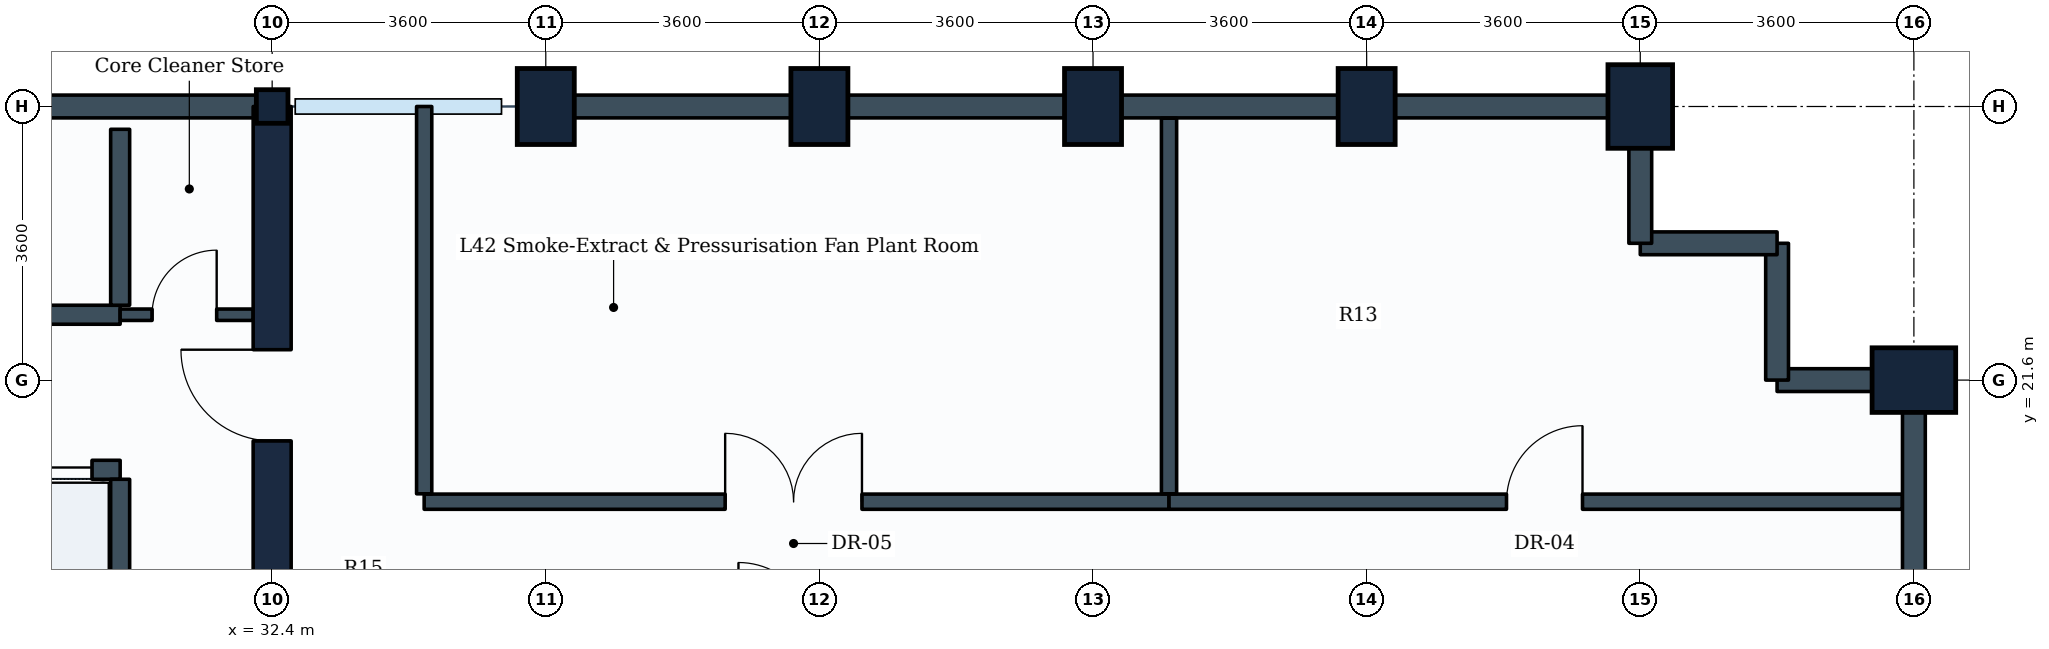
"""IFC4 building model, lengths in metres.
Left out: names, types, materials, properties, quantities, classifications, styles, units other than length and angle.
Written with IfcOpenShell. Run it as: python <this file> out.ifc"""

import sys

from ifc_helpers import new_model, si_unit, direction, frame, frame_2d, origin, origin_2d, place, context, subcontext, project, spatial, rectangle, i_section, extrude, element, fill, save


model = new_model("IFC4")
c1 = context("Model", 3, precision=1e-05, world=origin(), true_north=direction((0.0, 1.0)))
c2 = subcontext(c1, "Body", "Model", "MODEL_VIEW")
j1 = project(units=[si_unit("LENGTHUNIT", "METRE"), si_unit("PLANEANGLEUNIT", "RADIAN")], contexts=[c1])
p1 = place(None, origin())
s1 = spatial("IfcSite", under=j1, at=p1, CompositionType="ELEMENT")
p2 = place(p1, origin())
s2 = spatial("IfcBuilding", under=s1, at=p2, CompositionType="ELEMENT")
p3 = place(p2, frame((0.0, 0.0, 169.4)))
s3 = spatial("IfcBuildingStorey", under=s2, at=p3, CompositionType="ELEMENT", Elevation=169.4)
p4 = place(p3, frame((32.4, 25.2, 0.0), z_axis=(0.0, 0.0, 1.0), x_axis=(1.0, 0.0, 0.0)))
e1 = element("IfcColumn", 1, at=p4, inside=s3, PredefinedType="COLUMN", context=c2, shape_type="SweptSolid", body=[
    extrude(i_section(OverallWidth=0.416, OverallDepth=0.442, WebThickness=0.025, FlangeThickness=0.041, FilletRadius=0.015, at=origin_2d()), origin(), (0.0, 0.0, 1.0), 5.4),
])
for number, where, z_axis, x_axis in (
    (2, (36.0, 25.2, 0.0), (0.0, 0.0, 1.0), (1.0, 0.0, 0.0)),
    (3, (39.6, 25.2, 0.0), (0.0, 0.0, 1.0), (1.0, 0.0, 0.0)),
    (4, (43.2, 25.2, 0.0), (0.0, 0.0, 1.0), (1.0, 0.0, 0.0)),
    (5, (46.8, 25.2, 0.0), (0.0, 0.0, 1.0), (1.0, 0.0, 0.0)),
):
    element("IfcColumn", number, at=place(p3, frame(where, z_axis=z_axis, x_axis=x_axis)), inside=s3, PredefinedType="COLUMN", context=c2, shape_type="SweptSolid", body=[
        extrude(rectangle(XDim=0.75, YDim=1.0, at=origin_2d()), origin(), (0.0, 0.0, 1.0), 5.4),
    ])
for number, where, z_axis, x_axis in (
    (6, (50.4, 25.2, 0.0), (0.0, 0.0, 1.0), (1.0, 0.0, 0.0)),
    (7, (54.0, 21.6, 0.0), (0.0, 0.0, 1.0), (0.0, 1.0, 0.0)),
):
    element("IfcColumn", number, at=place(p3, frame(where, z_axis=z_axis, x_axis=x_axis)), inside=s3, PredefinedType="COLUMN", context=c2, shape_type="SweptSolid", body=[
        extrude(rectangle(XDim=0.85, YDim=1.1, at=origin_2d()), origin(), (0.0, 0.0, 1.0), 5.4),
    ])
p5 = place(p3, frame((54.0, 21.6, 0.0), z_axis=(0.0, 0.0, 1.0), x_axis=(0.0, -1.0, 0.0)))
e8 = element("IfcWall", 8, at=p5, inside=s3, PredefinedType="STANDARD", context=c2, shape_type="SweptSolid", body=[
    extrude(rectangle(XDim=3.6, YDim=0.3, at=frame_2d((1.8, 0.0))), origin(), (0.0, 0.0, 1.0), 4.03),
])
p6 = place(p3, frame((52.2, 21.6, 0.0), z_axis=(0.0, 0.0, 1.0), x_axis=(1.0, 0.0, 0.0)))
e9 = element("IfcWall", 9, at=p6, inside=s3, PredefinedType="STANDARD", context=c2, shape_type="SweptSolid", body=[
    extrude(rectangle(XDim=1.8, YDim=0.3, at=frame_2d((0.9, 0.0))), origin(), (0.0, 0.0, 1.0), 4.03),
])
p7 = place(p3, frame((52.2, 23.4, 0.0), z_axis=(0.0, 0.0, 1.0), x_axis=(0.0, -1.0, 0.0)))
e10 = element("IfcWall", 10, at=p7, inside=s3, PredefinedType="STANDARD", context=c2, shape_type="SweptSolid", body=[
    extrude(rectangle(XDim=1.8, YDim=0.3, at=frame_2d((0.9, 0.0))), origin(), (0.0, 0.0, 1.0), 5.065),
])
for number, where, z_axis, x_axis in (
    (11, (50.4, 23.4, 0.0), (0.0, 0.0, 1.0), (1.0, 0.0, 0.0)),
    (12, (50.4, 25.2, 0.0), (0.0, 0.0, 1.0), (0.0, -1.0, 0.0)),
):
    element("IfcWall", number, at=place(p3, frame(where, z_axis=z_axis, x_axis=x_axis)), inside=s3, PredefinedType="STANDARD", context=c2, shape_type="SweptSolid", body=[
        extrude(rectangle(XDim=1.8, YDim=0.3, at=frame_2d((0.9, 0.0))), origin(), (0.0, 0.0, 1.0), 3.58),
    ])
p8 = place(p3, frame((46.8, 25.2, 0.0), z_axis=(0.0, 0.0, 1.0), x_axis=(1.0, 0.0, 0.0)))
e13 = element("IfcWall", 13, at=p8, inside=s3, PredefinedType="STANDARD", context=c2, shape_type="SweptSolid", body=[
    extrude(rectangle(XDim=3.6, YDim=0.3, at=frame_2d((1.8, 0.0))), origin(), (0.0, 0.0, 1.0), 3.58),
])
p9 = place(p3, frame((43.2, 25.2, 0.0), z_axis=(0.0, 0.0, 1.0), x_axis=(1.0, 0.0, 0.0)))
e14 = element("IfcWall", 14, at=p9, inside=s3, PredefinedType="STANDARD", context=c2, shape_type="SweptSolid", body=[
    extrude(rectangle(XDim=3.6, YDim=0.3, at=frame_2d((1.8, 0.0))), origin(), (0.0, 0.0, 1.0), 4.53),
])
p10 = place(p3, frame((39.6, 25.2, 0.0), z_axis=(0.0, 0.0, 1.0), x_axis=(1.0, 0.0, 0.0)))
e15 = element("IfcWall", 15, at=p10, inside=s3, PredefinedType="STANDARD", context=c2, shape_type="SweptSolid", body=[
    extrude(rectangle(XDim=3.6, YDim=0.3, at=frame_2d((1.8, 0.0))), origin(), (0.0, 0.0, 1.0), 4.53),
])
p11 = place(p3, frame((36.0, 25.2, 0.0), z_axis=(0.0, 0.0, 1.0), x_axis=(1.0, 0.0, 0.0)))
e16 = element("IfcWall", 16, at=p11, inside=s3, PredefinedType="STANDARD", context=c2, shape_type="SweptSolid", body=[
    extrude(rectangle(XDim=3.6, YDim=0.3, at=frame_2d((1.8, 0.0))), origin(), (0.0, 0.0, 1.0), 4.53),
])
p12 = place(p3, frame((28.8, 25.2, 0.0), z_axis=(0.0, 0.0, 1.0), x_axis=(1.0, 0.0, 0.0)))
e17 = element("IfcWall", 17, at=p12, inside=s3, PredefinedType="STANDARD", context=c2, shape_type="SweptSolid", body=[
    extrude(rectangle(XDim=3.6, YDim=0.3, at=frame_2d((1.8, 0.0))), origin(), (0.0, 0.0, 1.0), 4.53),
])
p13 = place(p3, frame((32.4, 10.8, 0.0), z_axis=(0.0, 0.0, 1.0), x_axis=(0.0, 1.0, 0.0)))
e18 = element("IfcWall", 18, at=p13, inside=s3, PredefinedType="SHEAR", context=c2, shape_type="SweptSolid", body=[
    extrude(rectangle(XDim=14.4, YDim=0.5, at=frame_2d((7.2, 0.0))), origin(), (0.0, 0.0, 1.0), 5.08),
])
p14 = place(p13, frame((4.35, 0.0, 0.0)))
e19 = element("IfcOpeningElement", 19, at=p14, cuts=e18, PredefinedType="OPENING", context=c2, shape_type="SweptSolid", body=[
    extrude(rectangle(XDim=1.2, YDim=2.1, at=frame_2d((0.6, 1.05))), frame((0.0, 0.26, 0.0), z_axis=(0.0, -1.0, 0.0), x_axis=(1.0, 0.0, 0.0)), (0.0, 0.0, 1.0), 0.52),
])
p15 = place(p13, frame((10.0, 0.0, 0.0)))
e20 = element("IfcOpeningElement", 20, at=p15, cuts=e18, PredefinedType="OPENING", context=c2, shape_type="SweptSolid", body=[
    extrude(rectangle(XDim=1.2, YDim=2.1, at=frame_2d((0.6, 1.05))), frame((0.0, 0.26, 0.0), z_axis=(0.0, -1.0, 0.0), x_axis=(1.0, 0.0, 0.0)), (0.0, 0.0, 1.0), 0.52),
])
p16 = place(p3, frame((23.18, 20.42, 0.0), z_axis=(0.0, 0.0, 1.0), x_axis=(1.0, 0.0, 0.0)))
e21 = element("IfcWall", 21, at=p16, inside=s3, PredefinedType="PARTITIONING", context=c2, shape_type="SweptSolid", body=[
    extrude(rectangle(XDim=7.22, YDim=0.25, at=frame_2d((3.61, 0.0))), origin(), (0.0, 0.0, 1.0), 5.065),
])
p17 = place(p16, frame((0.41, 0.0, 0.0)))
e22 = element("IfcOpeningElement", 22, at=p17, cuts=e21, PredefinedType="OPENING", context=c2, shape_type="SweptSolid", body=[
    extrude(rectangle(XDim=1.1, YDim=2.1, at=frame_2d((0.55, 1.05))), frame((0.0, 0.135, 0.0), z_axis=(0.0, -1.0, 0.0), x_axis=(1.0, 0.0, 0.0)), (0.0, 0.0, 1.0), 0.27),
])
p18 = place(p16, frame((2.19, 0.0, 0.0)))
e23 = element("IfcOpeningElement", 23, at=p18, cuts=e21, PredefinedType="OPENING", context=c2, shape_type="SweptSolid", body=[
    extrude(rectangle(XDim=1.1, YDim=2.1, at=frame_2d((0.55, 1.05))), frame((0.0, 0.135, 0.0), z_axis=(0.0, -1.0, 0.0), x_axis=(1.0, 0.0, 0.0)), (0.0, 0.0, 1.0), 0.27),
])
p19 = place(p16, frame((3.97, 0.0, 0.0)))
e24 = element("IfcOpeningElement", 24, at=p19, cuts=e21, PredefinedType="OPENING", context=c2, shape_type="SweptSolid", body=[
    extrude(rectangle(XDim=1.1, YDim=2.1, at=frame_2d((0.55, 1.05))), frame((0.0, 0.135, 0.0), z_axis=(0.0, -1.0, 0.0), x_axis=(1.0, 0.0, 0.0)), (0.0, 0.0, 1.0), 0.27),
])
p20 = place(p16, frame((5.75, 0.0, 0.0)))
e25 = element("IfcOpeningElement", 25, at=p20, cuts=e21, PredefinedType="OPENING", context=c2, shape_type="SweptSolid", body=[
    extrude(rectangle(XDim=1.1, YDim=2.1, at=frame_2d((0.55, 1.05))), frame((0.0, 0.135, 0.0), z_axis=(0.0, -1.0, 0.0), x_axis=(1.0, 0.0, 0.0)), (0.0, 0.0, 1.0), 0.27),
])
p21 = place(p3, frame((30.4, 18.025, 0.0), z_axis=(0.0, 0.0, 1.0), x_axis=(0.0, 1.0, 0.0)))
e26 = element("IfcWall", 26, at=p21, inside=s3, PredefinedType="PARTITIONING", context=c2, shape_type="SweptSolid", body=[
    extrude(rectangle(XDim=2.27, YDim=0.25, at=frame_2d((1.135, 0.0))), origin(), (0.0, 0.0, 1.0), 5.065),
])
p22 = place(p3, frame((23.18, 22.46, 0.0), z_axis=(0.0, 0.0, 1.0), x_axis=(1.0, 0.0, 0.0)))
e27 = element("IfcWall", 27, at=p22, inside=s3, PredefinedType="PARTITIONING", context=c2, shape_type="SweptSolid", body=[
    extrude(rectangle(XDim=7.22, YDim=0.25, at=frame_2d((3.61, 0.0))), origin(), (0.0, 0.0, 1.0), 5.065),
])
p23 = place(p3, frame((30.4, 22.585, 0.0), z_axis=(0.0, 0.0, 1.0), x_axis=(0.0, 1.0, 0.0)))
e28 = element("IfcWall", 28, at=p23, inside=s3, PredefinedType="PARTITIONING", context=c2, shape_type="SweptSolid", body=[
    extrude(rectangle(XDim=2.315, YDim=0.25, at=frame_2d((1.157, 0.0))), origin(), (0.0, 0.0, 1.0), 5.065),
])
p24 = place(p3, frame((30.4, 22.46, 0.0), z_axis=(0.0, 0.0, 1.0), x_axis=(1.0, 0.0, 0.0)))
e29 = element("IfcWall", 29, at=p24, inside=s3, PredefinedType="PARTITIONING", context=c2, shape_type="SweptSolid", body=[
    extrude(rectangle(XDim=1.75, YDim=0.15, at=frame_2d((0.875, 0.0))), origin(), (0.0, 0.0, 1.0), 5.065),
])
p25 = place(p24, frame((0.42, 0.0, 0.0)))
e30 = element("IfcOpeningElement", 30, at=p25, cuts=e29, PredefinedType="OPENING", context=c2, shape_type="SweptSolid", body=[
    extrude(rectangle(XDim=0.85, YDim=2.1, at=frame_2d((0.425, 1.05))), frame((0.0, 0.085, 0.0), z_axis=(0.0, -1.0, 0.0), x_axis=(1.0, 0.0, 0.0)), (0.0, 0.0, 1.0), 0.17),
])
p26 = place(p3, frame((34.4, 20.0, 0.0), z_axis=(0.0, 0.0, 1.0), x_axis=(1.0, 0.0, 0.0)))
e31 = element("IfcWall", 31, at=p26, inside=s3, PredefinedType="PARTITIONING", context=c2, shape_type="SweptSolid", body=[
    extrude(rectangle(XDim=9.8, YDim=0.2, at=frame_2d((4.9, 0.0))), origin(), (0.0, 0.0, 1.0), 4.7),
])
p27 = place(p26, frame((3.96, 0.0, 0.0)))
e32 = element("IfcOpeningElement", 32, at=p27, cuts=e31, PredefinedType="OPENING", context=c2, shape_type="SweptSolid", body=[
    extrude(rectangle(XDim=1.8, YDim=2.2, at=frame_2d((0.9, 1.1))), frame((0.0, 0.11, 0.0), z_axis=(0.0, -1.0, 0.0), x_axis=(1.0, 0.0, 0.0)), (0.0, 0.0, 1.0), 0.22),
])
p28 = place(p3, frame((44.2, 20.0, 0.0), z_axis=(0.0, 0.0, 1.0), x_axis=(1.0, 0.0, 0.0)))
e33 = element("IfcWall", 33, at=p28, inside=s3, PredefinedType="PARTITIONING", context=c2, shape_type="SweptSolid", body=[
    extrude(rectangle(XDim=9.646, YDim=0.2, at=frame_2d((4.823, 0.0))), origin(), (0.0, 0.0, 1.0), 3.58),
])
p29 = place(p28, frame((4.44, 0.0, 0.0)))
e34 = element("IfcOpeningElement", 34, at=p29, cuts=e33, PredefinedType="OPENING", context=c2, shape_type="SweptSolid", body=[
    extrude(rectangle(XDim=1.0, YDim=2.1, at=frame_2d((0.5, 1.05))), frame((0.0, 0.11, 0.0), z_axis=(0.0, -1.0, 0.0), x_axis=(1.0, 0.0, 0.0)), (0.0, 0.0, 1.0), 0.22),
])
p30 = place(p3, frame((34.4, 20.104, 0.0), z_axis=(0.0, 0.0, 1.0), x_axis=(0.0, 1.0, 0.0)))
e35 = element("IfcWall", 35, at=p30, inside=s3, PredefinedType="PARTITIONING", context=c2, shape_type="SweptSolid", body=[
    extrude(rectangle(XDim=5.096, YDim=0.2, at=frame_2d((2.548, 0.0))), origin(), (0.0, 0.0, 1.0), 4.53),
])
p31 = place(p3, frame((44.2, 20.104, 0.0), z_axis=(0.0, 0.0, 1.0), x_axis=(0.0, 1.0, 0.0)))
e36 = element("IfcWall", 36, at=p31, inside=s3, PredefinedType="PARTITIONING", context=c2, shape_type="SweptSolid", body=[
    extrude(rectangle(XDim=4.942, YDim=0.2, at=frame_2d((2.471, 0.0))), origin(), (0.0, 0.0, 1.0), 4.53),
])
p32 = place(p20, origin())
e37 = element("IfcDoor", 37, at=p32, inside=s3, OperationType="SLIDING_TO_LEFT", PredefinedType="DOOR", context=c2, shape_type="SweptSolid", body=[
    extrude(rectangle(XDim=1.1, YDim=2.1, at=frame_2d((0.55, 1.05))), frame((0.0, 0.025, 0.0), z_axis=(0.0, -1.0, 0.0), x_axis=(1.0, 0.0, 0.0)), (0.0, 0.0, 1.0), 0.05),
])
fill(e25, e37)
p33 = place(p15, origin())
e38 = element("IfcDoor", 38, at=p33, inside=s3, OperationType="SINGLE_SWING_RIGHT", PredefinedType="DOOR", context=c2, shape_type="SweptSolid", body=[
    extrude(rectangle(XDim=1.2, YDim=2.1, at=frame_2d((0.6, 1.05))), frame((0.0, 0.025, 0.0), z_axis=(0.0, -1.0, 0.0), x_axis=(1.0, 0.0, 0.0)), (0.0, 0.0, 1.0), 0.05),
])
fill(e20, e38)
p34 = place(p25, origin())
e39 = element("IfcDoor", 39, at=p34, inside=s3, OperationType="SINGLE_SWING_RIGHT", PredefinedType="DOOR", context=c2, shape_type="SweptSolid", body=[
    extrude(rectangle(XDim=0.85, YDim=2.1, at=frame_2d((0.425, 1.05))), frame((0.0, 0.025, 0.0), z_axis=(0.0, -1.0, 0.0), x_axis=(1.0, 0.0, 0.0)), (0.0, 0.0, 1.0), 0.05),
])
fill(e30, e39)
p35 = place(p27, origin())
e40 = element("IfcDoor", 40, at=p35, inside=s3, OperationType="DOUBLE_DOOR_SINGLE_SWING", PredefinedType="DOOR", context=c2, shape_type="SweptSolid", body=[
    extrude(rectangle(XDim=1.8, YDim=2.2, at=frame_2d((0.9, 1.1))), frame((0.0, 0.025, 0.0), z_axis=(0.0, -1.0, 0.0), x_axis=(1.0, 0.0, 0.0)), (0.0, 0.0, 1.0), 0.05),
])
fill(e32, e40)
p36 = place(p29, origin())
e41 = element("IfcDoor", 41, at=p36, inside=s3, OperationType="SINGLE_SWING_RIGHT", PredefinedType="DOOR", context=c2, shape_type="SweptSolid", body=[
    extrude(rectangle(XDim=1.0, YDim=2.1, at=frame_2d((0.5, 1.05))), frame((0.0, 0.025, 0.0), z_axis=(0.0, -1.0, 0.0), x_axis=(1.0, 0.0, 0.0)), (0.0, 0.0, 1.0), 0.05),
])
fill(e34, e41)
save(model, sys.argv[1])
